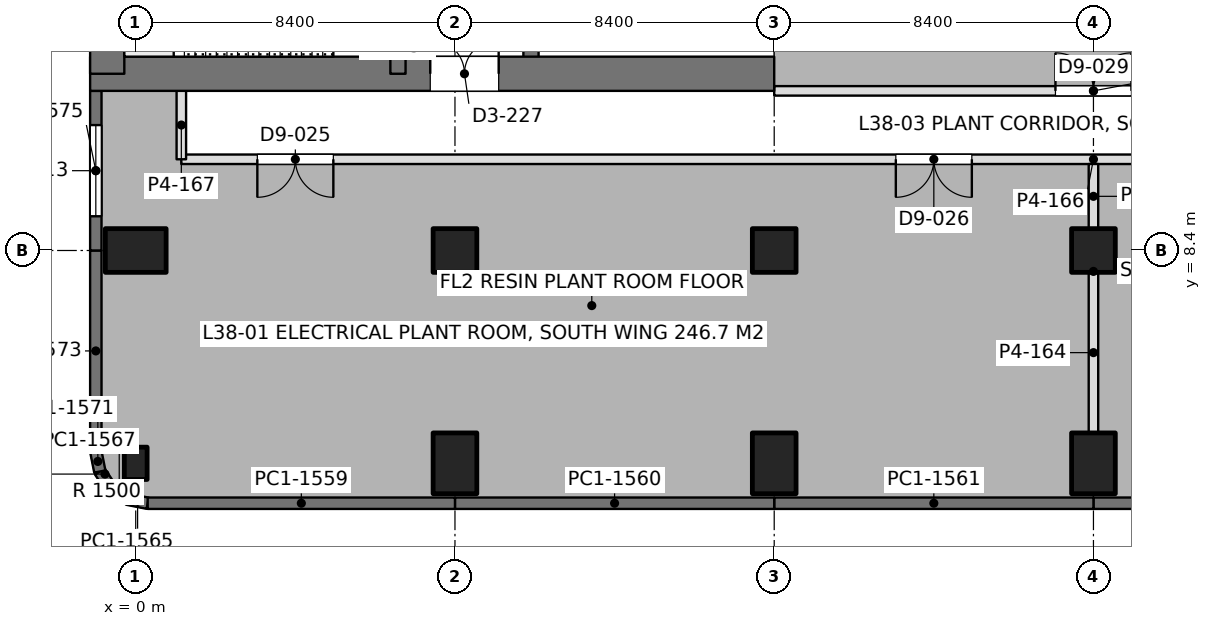
"""IFC4 building model, lengths in metres.
Left out: names, types, materials, properties, quantities, classifications, styles, units other than length and angle.
Written with IfcOpenShell. Run it as: python <this file> out.ifc"""

import sys

from ifc_helpers import new_model, si_unit, direction, frame, frame_2d, origin, origin_2d, place, context, subcontext, project, spatial, rectangle, extrude, element, fill, save


model = new_model("IFC4")
c1 = context("Model", 3, precision=1e-05, world=origin(), true_north=direction((0.0, 1.0)))
c2 = subcontext(c1, "Body", "Model", "MODEL_VIEW")
j1 = project(units=[si_unit("LENGTHUNIT", "METRE"), si_unit("PLANEANGLEUNIT", "RADIAN")], contexts=[c1])
p1 = place(None, origin())
s1 = spatial("IfcSite", under=j1, at=p1, CompositionType="ELEMENT")
p2 = place(p1, origin())
s2 = spatial("IfcBuilding", under=s1, at=p2, CompositionType="ELEMENT")
p3 = place(p2, frame((0.0, 0.0, 168.0)))
s3 = spatial("IfcBuildingStorey", under=s2, at=p3, CompositionType="ELEMENT", Elevation=168.0)
p4 = place(p3, frame((0.0, 2.8, 0.0), z_axis=(0.0, 0.0, 1.0), x_axis=(1.0, 0.0, 0.0)))
e1 = element("IfcColumn", 1, at=p4, inside=s3, PredefinedType="COLUMN", context=c2, shape_type="SweptSolid", body=[
    extrude(rectangle(XDim=0.6, YDim=0.85, at=origin_2d()), origin(), (0.0, 0.0, 1.0), 5.24),
])
p5 = place(p3, frame((0.0, 8.4, 0.0), z_axis=(0.0, 0.0, 1.0), x_axis=(0.0, 1.0, 0.0)))
e2 = element("IfcColumn", 2, at=p5, inside=s3, PredefinedType="COLUMN", context=c2, shape_type="SweptSolid", body=[
    extrude(rectangle(XDim=1.15, YDim=1.6, at=origin_2d()), origin(), (0.0, 0.0, 1.0), 5.4),
])
p6 = place(p3, frame((8.4, 2.8, 0.0), z_axis=(0.0, 0.0, 1.0), x_axis=(1.0, 0.0, 0.0)))
e3 = element("IfcColumn", 3, at=p6, inside=s3, PredefinedType="COLUMN", context=c2, shape_type="SweptSolid", body=[
    extrude(rectangle(XDim=1.15, YDim=1.6, at=origin_2d()), origin(), (0.0, 0.0, 1.0), 5.24),
])
p7 = place(p3, frame((8.4, 8.4, 0.0), z_axis=(0.0, 0.0, 1.0), x_axis=(1.0, 0.0, 0.0)))
e4 = element("IfcColumn", 4, at=p7, inside=s3, PredefinedType="COLUMN", context=c2, shape_type="SweptSolid", body=[
    extrude(rectangle(XDim=1.15, YDim=1.15, at=origin_2d()), origin(), (0.0, 0.0, 1.0), 5.4),
])
p8 = place(p3, frame((16.8, 2.8, 0.0), z_axis=(0.0, 0.0, 1.0), x_axis=(1.0, 0.0, 0.0)))
e5 = element("IfcColumn", 5, at=p8, inside=s3, PredefinedType="COLUMN", context=c2, shape_type="SweptSolid", body=[
    extrude(rectangle(XDim=1.15, YDim=1.6, at=origin_2d()), origin(), (0.0, 0.0, 1.0), 5.24),
])
p9 = place(p3, frame((16.8, 8.4, 0.0), z_axis=(0.0, 0.0, 1.0), x_axis=(1.0, 0.0, 0.0)))
e6 = element("IfcColumn", 6, at=p9, inside=s3, PredefinedType="COLUMN", context=c2, shape_type="SweptSolid", body=[
    extrude(rectangle(XDim=1.15, YDim=1.15, at=origin_2d()), origin(), (0.0, 0.0, 1.0), 5.4),
])
p10 = place(p3, frame((25.2, 2.8, 0.0), z_axis=(0.0, 0.0, 1.0), x_axis=(1.0, 0.0, 0.0)))
e7 = element("IfcColumn", 7, at=p10, inside=s3, PredefinedType="COLUMN", context=c2, shape_type="SweptSolid", body=[
    extrude(rectangle(XDim=1.15, YDim=1.6, at=origin_2d()), origin(), (0.0, 0.0, 1.0), 5.24),
])
p11 = place(p3, frame((25.2, 8.4, 0.0), z_axis=(0.0, 0.0, 1.0), x_axis=(1.0, 0.0, 0.0)))
e8 = element("IfcColumn", 8, at=p11, inside=s3, PredefinedType="COLUMN", context=c2, shape_type="SweptSolid", body=[
    extrude(rectangle(XDim=1.15, YDim=1.15, at=origin_2d()), origin(), (0.0, 0.0, 1.0), 5.4),
])
p12 = place(p3, frame((-1.2, 13.05, 0.0), z_axis=(0.0, 0.0, 1.0), x_axis=(1.0, 0.0, 0.0)))
e9 = element("IfcWall", 9, at=p12, inside=s3, PredefinedType="SHEAR", context=c2, shape_type="SweptSolid", body=[
    extrude(rectangle(XDim=18.0, YDim=0.9, at=frame_2d((9.0, 0.0))), origin(), (0.0, 0.0, 1.0), 5.4),
])
p13 = place(p12, frame((8.95, 0.0, 0.0)))
e10 = element("IfcOpeningElement", 10, at=p13, cuts=e9, PredefinedType="OPENING", context=c2, shape_type="SweptSolid", body=[
    extrude(rectangle(XDim=1.8, YDim=2.4, at=frame_2d((0.9, 1.2))), frame((0.0, 0.46, 0.0), z_axis=(0.0, -1.0, 0.0), x_axis=(1.0, 0.0, 0.0)), (0.0, 0.0, 1.0), 0.92),
])
p14 = place(p3, frame((-0.75, 13.05, 0.0), z_axis=(0.0, 0.0, 1.0), x_axis=(0.0, 1.0, 0.0)))
e11 = element("IfcWall", 11, at=p14, inside=s3, PredefinedType="SHEAR", context=c2, shape_type="SweptSolid", body=[
    extrude(rectangle(XDim=24.3, YDim=0.9, at=frame_2d((12.15, 0.0))), origin(), (0.0, 0.0, 1.0), 5.4),
])
p15 = place(p3, frame((6.9, 13.05, 0.0), z_axis=(0.0, 0.0, 1.0), x_axis=(0.0, 1.0, 0.0)))
e12 = element("IfcWall", 12, at=p15, inside=s3, PredefinedType="SHEAR", context=c2, shape_type="SweptSolid", body=[
    extrude(rectangle(XDim=24.3, YDim=0.4, at=frame_2d((12.15, 0.0))), origin(), (0.0, 0.0, 1.0), 5.4),
])
p16 = place(p15, frame((1.3, 0.0, 0.0)))
e13 = element("IfcOpeningElement", 13, at=p16, cuts=e12, PredefinedType="OPENING", context=c2, shape_type="SweptSolid", body=[
    extrude(rectangle(XDim=1.0, YDim=2.2, at=frame_2d((0.5, 1.1))), frame((0.0, 0.21, 0.0), z_axis=(0.0, -1.0, 0.0), x_axis=(1.0, 0.0, 0.0)), (0.0, 0.0, 1.0), 0.42),
])
p17 = place(p15, frame((22.0, 0.0, 0.0)))
e14 = element("IfcOpeningElement", 14, at=p17, cuts=e12, PredefinedType="OPENING", context=c2, shape_type="SweptSolid", body=[
    extrude(rectangle(XDim=1.0, YDim=2.2, at=frame_2d((0.5, 1.1))), frame((0.0, 0.21, 0.0), z_axis=(0.0, -1.0, 0.0), x_axis=(1.0, 0.0, 0.0)), (0.0, 0.0, 1.0), 0.42),
])
p18 = place(p15, frame((5.55, 0.0, 0.0)))
e15 = element("IfcOpeningElement", 15, at=p18, cuts=e12, PredefinedType="OPENING", context=c2, shape_type="SweptSolid", body=[
    extrude(rectangle(XDim=1.0, YDim=2.2, at=frame_2d((0.5, 1.1))), frame((0.0, 0.21, 0.0), z_axis=(0.0, -1.0, 0.0), x_axis=(1.0, 0.0, 0.0)), (0.0, 0.0, 1.0), 0.42),
])
p19 = place(p15, frame((9.55, 0.0, 0.0)))
e16 = element("IfcOpeningElement", 16, at=p19, cuts=e12, PredefinedType="OPENING", context=c2, shape_type="SweptSolid", body=[
    extrude(rectangle(XDim=1.0, YDim=2.2, at=frame_2d((0.5, 1.1))), frame((0.0, 0.21, 0.0), z_axis=(0.0, -1.0, 0.0), x_axis=(1.0, 0.0, 0.0)), (0.0, 0.0, 1.0), 0.42),
])
p20 = place(p15, frame((12.8, 0.0, 0.0)))
e17 = element("IfcOpeningElement", 17, at=p20, cuts=e12, PredefinedType="OPENING", context=c2, shape_type="SweptSolid", body=[
    extrude(rectangle(XDim=1.1, YDim=2.2, at=frame_2d((0.55, 1.1))), frame((0.0, 0.21, 0.0), z_axis=(0.0, -1.0, 0.0), x_axis=(1.0, 0.0, 0.0)), (0.0, 0.0, 1.0), 0.42),
])
p21 = place(p15, frame((15.538, 0.0, 0.0)))
e18 = element("IfcOpeningElement", 18, at=p21, cuts=e12, PredefinedType="OPENING", context=c2, shape_type="SweptSolid", body=[
    extrude(rectangle(XDim=1.1, YDim=2.2, at=frame_2d((0.55, 1.1))), frame((0.0, 0.21, 0.0), z_axis=(0.0, -1.0, 0.0), x_axis=(1.0, 0.0, 0.0)), (0.0, 0.0, 1.0), 0.42),
])
p22 = place(p15, frame((18.262, 0.0, 0.0)))
e19 = element("IfcOpeningElement", 19, at=p22, cuts=e12, PredefinedType="OPENING", context=c2, shape_type="SweptSolid", body=[
    extrude(rectangle(XDim=1.1, YDim=2.2, at=frame_2d((0.55, 1.1))), frame((0.0, 0.21, 0.0), z_axis=(0.0, -1.0, 0.0), x_axis=(1.0, 0.0, 0.0)), (0.0, 0.0, 1.0), 0.42),
])
p23 = place(p3, frame((10.4, 13.05, 0.0), z_axis=(0.0, 0.0, 1.0), x_axis=(0.0, 1.0, 0.0)))
e20 = element("IfcWall", 20, at=p23, inside=s3, PredefinedType="SHEAR", context=c2, shape_type="SweptSolid", body=[
    extrude(rectangle(XDim=24.3, YDim=0.4, at=frame_2d((12.15, 0.0))), origin(), (0.0, 0.0, 1.0), 5.4),
])
p24 = place(p23, frame((10.05, 0.0, 0.0)))
e21 = element("IfcOpeningElement", 21, at=p24, cuts=e20, PredefinedType="OPENING", context=c2, shape_type="SweptSolid", body=[
    extrude(rectangle(XDim=1.1, YDim=2.2, at=frame_2d((0.55, 1.1))), frame((0.0, 0.21, 0.0), z_axis=(0.0, -1.0, 0.0), x_axis=(1.0, 0.0, 0.0)), (0.0, 0.0, 1.0), 0.42),
])
p25 = place(p23, frame((12.9, 0.0, 0.0)))
e22 = element("IfcOpeningElement", 22, at=p25, cuts=e20, PredefinedType="OPENING", context=c2, shape_type="SweptSolid", body=[
    extrude(rectangle(XDim=1.1, YDim=2.2, at=frame_2d((0.55, 1.1))), frame((0.0, 0.21, 0.0), z_axis=(0.0, -1.0, 0.0), x_axis=(1.0, 0.0, 0.0)), (0.0, 0.0, 1.0), 0.42),
])
p26 = place(p23, frame((21.45, 0.0, 0.0)))
e23 = element("IfcOpeningElement", 23, at=p26, cuts=e20, PredefinedType="OPENING", context=c2, shape_type="SweptSolid", body=[
    extrude(rectangle(XDim=1.1, YDim=2.2, at=frame_2d((0.55, 1.1))), frame((0.0, 0.21, 0.0), z_axis=(0.0, -1.0, 0.0), x_axis=(1.0, 0.0, 0.0)), (0.0, 0.0, 1.0), 0.42),
])
p27 = place(p23, frame((5.8, 0.0, 0.0)))
e24 = element("IfcOpeningElement", 24, at=p27, cuts=e20, PredefinedType="OPENING", context=c2, shape_type="SweptSolid", body=[
    extrude(rectangle(XDim=1.8, YDim=2.4, at=frame_2d((0.9, 1.2))), frame((0.0, 0.21, 0.0), z_axis=(0.0, -1.0, 0.0), x_axis=(1.0, 0.0, 0.0)), (0.0, 0.0, 1.0), 0.42),
])
p28 = place(p23, frame((1.05, 0.0, 0.0)))
e25 = element("IfcOpeningElement", 25, at=p28, cuts=e20, PredefinedType="OPENING", context=c2, shape_type="SweptSolid", body=[
    extrude(rectangle(XDim=1.8, YDim=2.4, at=frame_2d((0.9, 1.2))), frame((0.0, 0.21, 0.0), z_axis=(0.0, -1.0, 0.0), x_axis=(1.0, 0.0, 0.0)), (0.0, 0.0, 1.0), 0.42),
])
p29 = place(p3, frame((33.6, 1.75, 0.0), z_axis=(0.0, 0.0, 1.0), x_axis=(-1.0, 0.0, 0.0)))
e26 = element("IfcWall", 26, at=p29, inside=s3, PredefinedType="SOLIDWALL", context=c2, shape_type="SweptSolid", body=[
    extrude(rectangle(XDim=8.4, YDim=0.3, at=frame_2d((4.2, 0.0))), origin(), (0.0, 0.0, 1.0), 5.04),
])
p30 = place(p3, frame((25.2, 1.75, 0.0), z_axis=(0.0, 0.0, 1.0), x_axis=(-1.0, 0.0, 0.0)))
e27 = element("IfcWall", 27, at=p30, inside=s3, PredefinedType="SOLIDWALL", context=c2, shape_type="SweptSolid", body=[
    extrude(rectangle(XDim=8.4, YDim=0.3, at=frame_2d((4.2, 0.0))), origin(), (0.0, 0.0, 1.0), 5.04),
])
p31 = place(p3, frame((16.8, 1.75, 0.0), z_axis=(0.0, 0.0, 1.0), x_axis=(-1.0, 0.0, 0.0)))
e28 = element("IfcWall", 28, at=p31, inside=s3, PredefinedType="SOLIDWALL", context=c2, shape_type="SweptSolid", body=[
    extrude(rectangle(XDim=8.4, YDim=0.3, at=frame_2d((4.2, 0.0))), origin(), (0.0, 0.0, 1.0), 5.04),
])
p32 = place(p3, frame((8.4, 1.75, 0.0), z_axis=(0.0, 0.0, 1.0), x_axis=(-1.0, 0.0, 0.0)))
e29 = element("IfcWall", 29, at=p32, inside=s3, PredefinedType="SOLIDWALL", context=c2, shape_type="SweptSolid", body=[
    extrude(rectangle(XDim=8.085, YDim=0.3, at=frame_2d((4.042, 0.0))), origin(), (0.0, 0.0, 1.0), 5.04),
])
p33 = place(p3, frame((0.315, 1.75, 0.0), z_axis=(0.0, 0.0, 1.0), x_axis=(-0.980788534345, 0.195073962632, 0.0)))
e30 = element("IfcWall", 30, at=p33, inside=s3, PredefinedType="SOLIDWALL", context=c2, shape_type="SweptSolid", body=[
    extrude(rectangle(XDim=0.541, YDim=0.3, at=frame_2d((0.271, 0.0))), origin(), (0.0, 0.0, 1.0), 5.04),
])
for number, where, z_axis, x_axis in (
    (31, (-0.216, 1.855, 0.0), (0.0, 0.0, 1.0), (-0.831, 0.556, 0.0)),
    (32, (-0.653, 2.147, 0.0), (0.0, 0.0, 1.0), (-0.556, 0.831, 0.0)),
):
    element("IfcWall", number, at=place(p3, frame(where, z_axis=z_axis, x_axis=x_axis)), inside=s3, PredefinedType="SOLIDWALL", context=c2, shape_type="SweptSolid", body=[
        extrude(rectangle(XDim=0.526, YDim=0.3, at=frame_2d((0.263, 0.0))), origin(), (0.0, 0.0, 1.0), 5.04),
    ])
p34 = place(p3, frame((-0.945, 2.584, 0.0), z_axis=(0.0, 0.0, 1.0), x_axis=(-0.195073962632, 0.980788534345, 0.0)))
e33 = element("IfcWall", 33, at=p34, inside=s3, PredefinedType="SOLIDWALL", context=c2, shape_type="SweptSolid", body=[
    extrude(rectangle(XDim=0.541, YDim=0.3, at=frame_2d((0.271, 0.0))), origin(), (0.0, 0.0, 1.0), 5.04),
])
p35 = place(p3, frame((-1.05, 3.115, 0.0), z_axis=(0.0, 0.0, 1.0), x_axis=(0.0, 1.0, 0.0)))
e34 = element("IfcWall", 34, at=p35, inside=s3, PredefinedType="SOLIDWALL", context=c2, shape_type="SweptSolid", body=[
    extrude(rectangle(XDim=5.285, YDim=0.3, at=frame_2d((2.643, 0.0))), origin(), (0.0, 0.0, 1.0), 5.24),
])
p36 = place(p3, frame((-1.05, 8.4, 0.0), z_axis=(0.0, 0.0, 1.0), x_axis=(0.0, 1.0, 0.0)))
e35 = element("IfcWall", 35, at=p36, inside=s3, PredefinedType="SOLIDWALL", context=c2, shape_type="SweptSolid", body=[
    extrude(rectangle(XDim=4.2, YDim=0.3, at=frame_2d((2.1, 0.0))), origin(), (0.0, 0.0, 1.0), 5.25),
])
p37 = place(p36, frame((0.9, 0.0, 1.2)))
e36 = element("IfcOpeningElement", 36, at=p37, cuts=e35, PredefinedType="OPENING", context=c2, shape_type="SweptSolid", body=[
    extrude(rectangle(XDim=2.4, YDim=2.4, at=frame_2d((1.2, 1.2))), frame((0.0, 0.16, 0.0), z_axis=(0.0, -1.0, 0.0), x_axis=(1.0, 0.0, 0.0)), (0.0, 0.0, 1.0), 0.32),
])
p38 = place(p3, frame((1.2, 10.8, 0.0), z_axis=(0.0, 0.0, 1.0), x_axis=(1.0, 0.0, 0.0)))
e37 = element("IfcWall", 37, at=p38, inside=s3, PredefinedType="PARTITIONING", context=c2, shape_type="SweptSolid", body=[
    extrude(rectangle(XDim=48.0, YDim=0.25, at=frame_2d((24.0, 0.0))), origin(), (0.0, 0.0, 1.0), 4.725),
])
p39 = place(p38, frame((2.0, 0.0, 0.0)))
e38 = element("IfcOpeningElement", 38, at=p39, cuts=e37, PredefinedType="OPENING", context=c2, shape_type="SweptSolid", body=[
    extrude(rectangle(XDim=2.0, YDim=2.4, at=frame_2d((1.0, 1.2))), frame((0.0, 0.135, 0.0), z_axis=(0.0, -1.0, 0.0), x_axis=(1.0, 0.0, 0.0)), (0.0, 0.0, 1.0), 0.27),
])
p40 = place(p38, frame((18.8, 0.0, 0.0)))
e39 = element("IfcOpeningElement", 39, at=p40, cuts=e37, PredefinedType="OPENING", context=c2, shape_type="SweptSolid", body=[
    extrude(rectangle(XDim=2.0, YDim=2.4, at=frame_2d((1.0, 1.2))), frame((0.0, 0.135, 0.0), z_axis=(0.0, -1.0, 0.0), x_axis=(1.0, 0.0, 0.0)), (0.0, 0.0, 1.0), 0.27),
])
p41 = place(p38, frame((27.2, 0.0, 0.0)))
e40 = element("IfcOpeningElement", 40, at=p41, cuts=e37, PredefinedType="OPENING", context=c2, shape_type="SweptSolid", body=[
    extrude(rectangle(XDim=2.0, YDim=2.4, at=frame_2d((1.0, 1.2))), frame((0.0, 0.135, 0.0), z_axis=(0.0, -1.0, 0.0), x_axis=(1.0, 0.0, 0.0)), (0.0, 0.0, 1.0), 0.27),
])
p42 = place(p38, frame((44.0, 0.0, 0.0)))
e41 = element("IfcOpeningElement", 41, at=p42, cuts=e37, PredefinedType="OPENING", context=c2, shape_type="SweptSolid", body=[
    extrude(rectangle(XDim=2.0, YDim=2.4, at=frame_2d((1.0, 1.2))), frame((0.0, 0.135, 0.0), z_axis=(0.0, -1.0, 0.0), x_axis=(1.0, 0.0, 0.0)), (0.0, 0.0, 1.0), 0.27),
])
p43 = place(p3, frame((1.2, 10.8, 0.0), z_axis=(0.0, 0.0, 1.0), x_axis=(0.0, 1.0, 0.0)))
e42 = element("IfcWall", 42, at=p43, inside=s3, PredefinedType="PARTITIONING", context=c2, shape_type="SweptSolid", body=[
    extrude(rectangle(XDim=1.802, YDim=0.25, at=frame_2d((0.901, 0.0))), origin(), (0.0, 0.0, 1.0), 5.25),
])
p44 = place(p3, frame((25.2, 3.599, 0.0), z_axis=(0.0, 0.0, 1.0), x_axis=(0.0, 1.0, 0.0)))
e43 = element("IfcWall", 43, at=p44, inside=s3, PredefinedType="PARTITIONING", context=c2, shape_type="SweptSolid", body=[
    extrude(rectangle(XDim=4.227, YDim=0.25, at=frame_2d((2.113, 0.0))), origin(), (0.0, 0.0, 1.0), 3.24),
])
p45 = place(p3, frame((25.2, 8.974, 0.0), z_axis=(0.0, 0.0, 1.0), x_axis=(0.0, 1.0, 0.0)))
e44 = element("IfcWall", 44, at=p45, inside=s3, PredefinedType="PARTITIONING", context=c2, shape_type="SweptSolid", body=[
    extrude(rectangle(XDim=1.702, YDim=0.25, at=frame_2d((0.851, 0.0))), origin(), (0.0, 0.0, 1.0), 4.75),
])
p46 = place(p3, frame((16.8, 12.6, 0.0), z_axis=(0.0, 0.0, 1.0), x_axis=(1.0, 0.0, 0.0)))
e45 = element("IfcWall", 45, at=p46, inside=s3, PredefinedType="PARTITIONING", context=c2, shape_type="SweptSolid", body=[
    extrude(rectangle(XDim=16.8, YDim=0.25, at=frame_2d((8.4, 0.0))), origin(), (0.0, 0.0, 1.0), 4.725),
])
p47 = place(p46, frame((7.4, 0.0, 0.0)))
e46 = element("IfcOpeningElement", 46, at=p47, cuts=e45, PredefinedType="OPENING", context=c2, shape_type="SweptSolid", body=[
    extrude(rectangle(XDim=2.0, YDim=2.4, at=frame_2d((1.0, 1.2))), frame((0.0, 0.135, 0.0), z_axis=(0.0, -1.0, 0.0), x_axis=(1.0, 0.0, 0.0)), (0.0, 0.0, 1.0), 0.27),
])
p48 = place(p37, origin())
e47 = element("IfcWindow", 47, at=p48, inside=s3, PartitioningType="SINGLE_PANEL", PredefinedType="USERDEFINED", context=c2, shape_type="SweptSolid", body=[
    extrude(rectangle(XDim=2.4, YDim=2.4, at=frame_2d((1.2, 1.2))), frame((0.0, 0.03, 0.0), z_axis=(0.0, -1.0, 0.0), x_axis=(1.0, 0.0, 0.0)), (0.0, 0.0, 1.0), 0.06),
])
fill(e36, e47)
p49 = place(p13, origin())
e48 = element("IfcDoor", 48, at=p49, inside=s3, OperationType="DOUBLE_DOOR_SINGLE_SWING", PredefinedType="DOOR", context=c2, shape_type="SweptSolid", body=[
    extrude(rectangle(XDim=1.8, YDim=2.4, at=frame_2d((0.9, 1.2))), frame((0.0, 0.025, 0.0), z_axis=(0.0, -1.0, 0.0), x_axis=(1.0, 0.0, 0.0)), (0.0, 0.0, 1.0), 0.05),
])
fill(e10, e48)
p50 = place(p39, frame((2.0, 0.0, 0.0), z_axis=(0.0, 0.0, 1.0), x_axis=(-1.0, 0.0, 0.0)))
e49 = element("IfcDoor", 49, at=p50, inside=s3, OperationType="DOUBLE_DOOR_SINGLE_SWING", PredefinedType="DOOR", context=c2, shape_type="SweptSolid", body=[
    extrude(rectangle(XDim=2.0, YDim=2.4, at=frame_2d((1.0, 1.2))), frame((0.0, 0.025, 0.0), z_axis=(0.0, -1.0, 0.0), x_axis=(1.0, 0.0, 0.0)), (0.0, 0.0, 1.0), 0.05),
])
fill(e38, e49)
p51 = place(p40, frame((2.0, 0.0, 0.0), z_axis=(0.0, 0.0, 1.0), x_axis=(-1.0, 0.0, 0.0)))
e50 = element("IfcDoor", 50, at=p51, inside=s3, OperationType="DOUBLE_DOOR_SINGLE_SWING", PredefinedType="DOOR", context=c2, shape_type="SweptSolid", body=[
    extrude(rectangle(XDim=2.0, YDim=2.4, at=frame_2d((1.0, 1.2))), frame((0.0, 0.025, 0.0), z_axis=(0.0, -1.0, 0.0), x_axis=(1.0, 0.0, 0.0)), (0.0, 0.0, 1.0), 0.05),
])
fill(e39, e50)
p52 = place(p47, origin())
e51 = element("IfcDoor", 51, at=p52, inside=s3, OperationType="DOUBLE_DOOR_SINGLE_SWING", PredefinedType="DOOR", context=c2, shape_type="SweptSolid", body=[
    extrude(rectangle(XDim=2.0, YDim=2.4, at=frame_2d((1.0, 1.2))), frame((0.0, 0.025, 0.0), z_axis=(0.0, -1.0, 0.0), x_axis=(1.0, 0.0, 0.0)), (0.0, 0.0, 1.0), 0.05),
])
fill(e46, e51)
save(model, sys.argv[1])
